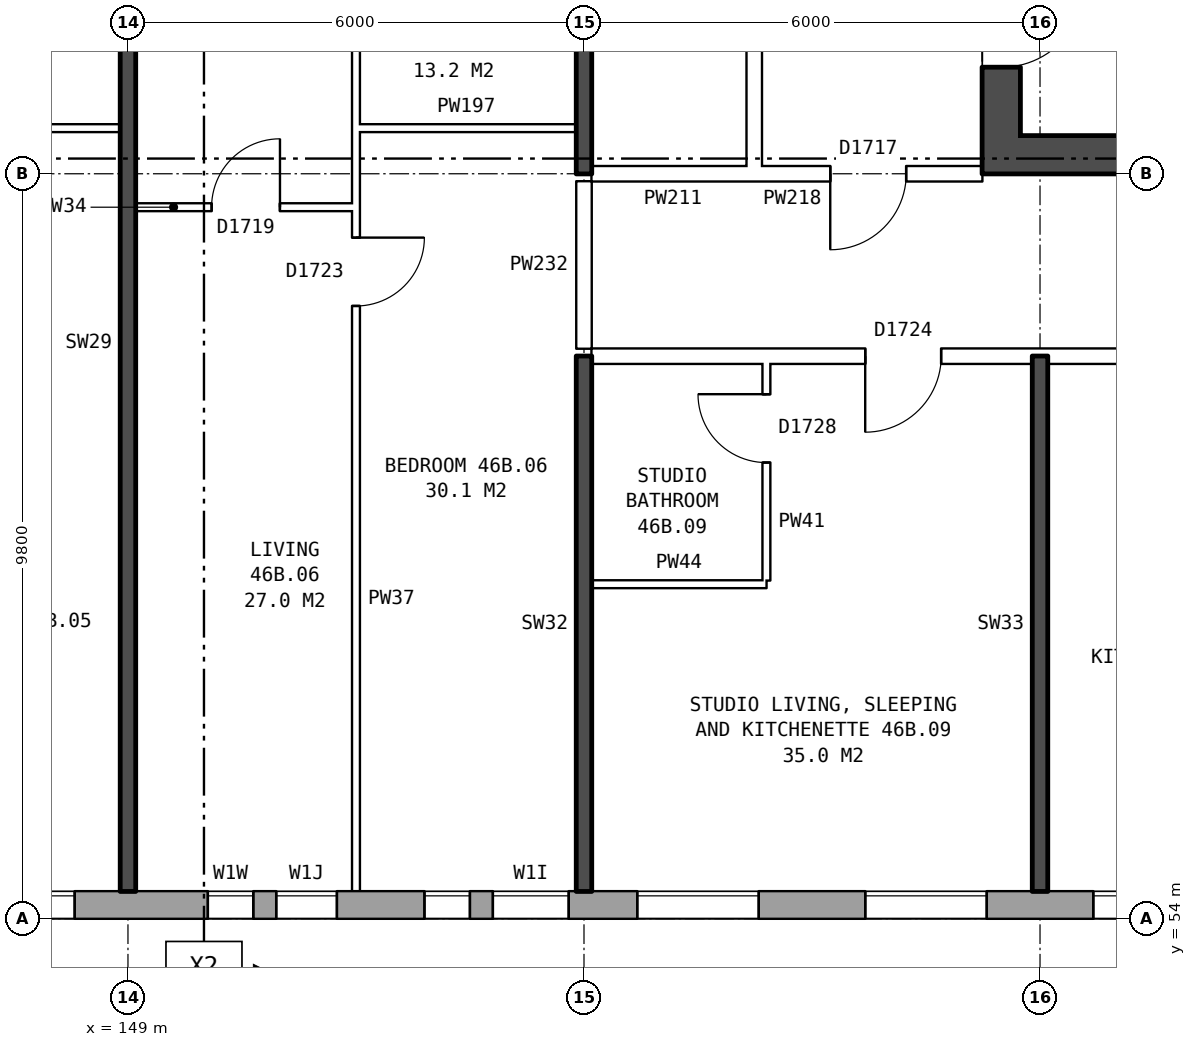
"""IFC4 building model, lengths in metres.
Left out: names, types, materials, properties, quantities, classifications, styles, units other than length and angle.
Written with IfcOpenShell. Run it as: python <this file> out.ifc"""

import sys

from ifc_helpers import new_model, si_unit, direction, frame, frame_2d, origin, place, context, subcontext, project, spatial, rectangle, extrude, element, fill, save


model = new_model("IFC4")
c1 = context("Model", 3, precision=1e-05, world=origin(), true_north=direction((0.0, 1.0)))
c2 = subcontext(c1, "Body", "Model", "MODEL_VIEW")
j1 = project(units=[si_unit("LENGTHUNIT", "METRE"), si_unit("PLANEANGLEUNIT", "RADIAN")], contexts=[c1])
p1 = place(None, origin())
s1 = spatial("IfcSite", under=j1, at=p1, CompositionType="ELEMENT")
p2 = place(p1, origin())
s2 = spatial("IfcBuilding", under=s1, at=p2, CompositionType="ELEMENT")
p3 = place(p2, frame((0.0, 0.0, 164.0)))
s3 = spatial("IfcBuildingStorey", under=s2, at=p3, CompositionType="ELEMENT", Elevation=164.0)
p4 = place(p3, frame((134.075, 54.18, 0.0), z_axis=(0.0, 0.0, 1.0), x_axis=(1.0, 0.0, 0.0)))
e1 = element("IfcWall", 1, at=p4, inside=s3, PredefinedType="STANDARD", context=c2, shape_type="SweptSolid", body=[
    extrude(rectangle(XDim=34.351, YDim=0.36, at=frame_2d((17.175, 0.0))), origin(), (0.0, 0.0, 1.0), 2.85),
])
p5 = place(p4, frame((0.625, 0.0, 0.8)))
e2 = element("IfcOpeningElement", 2, at=p5, cuts=e1, PredefinedType="OPENING", context=c2, shape_type="SweptSolid", body=[
    extrude(rectangle(XDim=1.6, YDim=1.8, at=frame_2d((0.8, 0.9))), frame((0.0, 0.19, 0.0), z_axis=(0.0, -1.0, 0.0), x_axis=(1.0, 0.0, 0.0)), (0.0, 0.0, 1.0), 0.38),
])
p6 = place(p4, frame((3.625, 0.0, 0.8)))
e3 = element("IfcOpeningElement", 3, at=p6, cuts=e1, PredefinedType="OPENING", context=c2, shape_type="SweptSolid", body=[
    extrude(rectangle(XDim=1.6, YDim=1.8, at=frame_2d((0.8, 0.9))), frame((0.0, 0.19, 0.0), z_axis=(0.0, -1.0, 0.0), x_axis=(1.0, 0.0, 0.0)), (0.0, 0.0, 1.0), 0.38),
])
p7 = place(p4, frame((6.625, 0.0, 0.8)))
e4 = element("IfcOpeningElement", 4, at=p7, cuts=e1, PredefinedType="OPENING", context=c2, shape_type="SweptSolid", body=[
    extrude(rectangle(XDim=1.6, YDim=1.8, at=frame_2d((0.8, 0.9))), frame((0.0, 0.19, 0.0), z_axis=(0.0, -1.0, 0.0), x_axis=(1.0, 0.0, 0.0)), (0.0, 0.0, 1.0), 0.38),
])
p8 = place(p4, frame((9.625, 0.0, 0.8)))
e5 = element("IfcOpeningElement", 5, at=p8, cuts=e1, PredefinedType="OPENING", context=c2, shape_type="SweptSolid", body=[
    extrude(rectangle(XDim=1.6, YDim=1.8, at=frame_2d((0.8, 0.9))), frame((0.0, 0.19, 0.0), z_axis=(0.0, -1.0, 0.0), x_axis=(1.0, 0.0, 0.0)), (0.0, 0.0, 1.0), 0.38),
])
p9 = place(p4, frame((12.625, 0.0, 0.8)))
e6 = element("IfcOpeningElement", 6, at=p9, cuts=e1, PredefinedType="OPENING", context=c2, shape_type="SweptSolid", body=[
    extrude(rectangle(XDim=1.6, YDim=1.8, at=frame_2d((0.8, 0.9))), frame((0.0, 0.19, 0.0), z_axis=(0.0, -1.0, 0.0), x_axis=(1.0, 0.0, 0.0)), (0.0, 0.0, 1.0), 0.38),
])
p10 = place(p4, frame((15.975, 0.0, 0.15)))
e7 = element("IfcOpeningElement", 7, at=p10, cuts=e1, PredefinedType="OPENING", context=c2, shape_type="SweptSolid", body=[
    extrude(rectangle(XDim=0.6, YDim=0.9, at=frame_2d((0.3, 0.45))), frame((0.0, 0.19, 0.0), z_axis=(0.0, -1.0, 0.0), x_axis=(1.0, 0.0, 0.0)), (0.0, 0.0, 1.0), 0.38),
])
p11 = place(p4, frame((18.825, 0.0, 1.7)))
e8 = element("IfcOpeningElement", 8, at=p11, cuts=e1, PredefinedType="OPENING", context=c2, shape_type="SweptSolid", body=[
    extrude(rectangle(XDim=0.6, YDim=0.9, at=frame_2d((0.3, 0.45))), frame((0.0, 0.19, 0.0), z_axis=(0.0, -1.0, 0.0), x_axis=(1.0, 0.0, 0.0)), (0.0, 0.0, 1.0), 0.38),
])
p12 = place(p4, frame((21.625, 0.0, 0.8)))
e9 = element("IfcOpeningElement", 9, at=p12, cuts=e1, PredefinedType="OPENING", context=c2, shape_type="SweptSolid", body=[
    extrude(rectangle(XDim=1.6, YDim=1.8, at=frame_2d((0.8, 0.9))), frame((0.0, 0.19, 0.0), z_axis=(0.0, -1.0, 0.0), x_axis=(1.0, 0.0, 0.0)), (0.0, 0.0, 1.0), 0.38),
])
p13 = place(p4, frame((24.625, 0.0, 0.8)))
e10 = element("IfcOpeningElement", 10, at=p13, cuts=e1, PredefinedType="OPENING", context=c2, shape_type="SweptSolid", body=[
    extrude(rectangle(XDim=1.6, YDim=1.8, at=frame_2d((0.8, 0.9))), frame((0.0, 0.19, 0.0), z_axis=(0.0, -1.0, 0.0), x_axis=(1.0, 0.0, 0.0)), (0.0, 0.0, 1.0), 0.38),
])
p14 = place(p4, frame((27.625, 0.0, 0.8)))
e11 = element("IfcOpeningElement", 11, at=p14, cuts=e1, PredefinedType="OPENING", context=c2, shape_type="SweptSolid", body=[
    extrude(rectangle(XDim=1.6, YDim=1.8, at=frame_2d((0.8, 0.9))), frame((0.0, 0.19, 0.0), z_axis=(0.0, -1.0, 0.0), x_axis=(1.0, 0.0, 0.0)), (0.0, 0.0, 1.0), 0.38),
])
p15 = place(p4, frame((30.625, 0.0, 0.8)))
e12 = element("IfcOpeningElement", 12, at=p15, cuts=e1, PredefinedType="OPENING", context=c2, shape_type="SweptSolid", body=[
    extrude(rectangle(XDim=1.6, YDim=1.8, at=frame_2d((0.8, 0.9))), frame((0.0, 0.19, 0.0), z_axis=(0.0, -1.0, 0.0), x_axis=(1.0, 0.0, 0.0)), (0.0, 0.0, 1.0), 0.38),
])
p16 = place(p4, frame((16.875, 0.0, 0.15)))
e13 = element("IfcOpeningElement", 13, at=p16, cuts=e1, PredefinedType="OPENING", context=c2, shape_type="SweptSolid", body=[
    extrude(rectangle(XDim=0.8, YDim=1.5, at=frame_2d((0.4, 0.75))), frame((0.0, 0.19, 0.0), z_axis=(0.0, -1.0, 0.0), x_axis=(1.0, 0.0, 0.0)), (0.0, 0.0, 1.0), 0.38),
])
p17 = place(p4, frame((19.725, 0.0, 0.9)))
e14 = element("IfcOpeningElement", 14, at=p17, cuts=e1, PredefinedType="OPENING", context=c2, shape_type="SweptSolid", body=[
    extrude(rectangle(XDim=1.0, YDim=1.5, at=frame_2d((0.5, 0.75))), frame((0.0, 0.19, 0.0), z_axis=(0.0, -1.0, 0.0), x_axis=(1.0, 0.0, 0.0)), (0.0, 0.0, 1.0), 0.38),
])
p18 = place(p3, frame((160.49, 76.2, 0.0), z_axis=(0.0, 0.0, 1.0), x_axis=(0.0, -1.0, 0.0)))
e15 = element("IfcWall", 15, at=p18, inside=s3, PredefinedType="SHEAR", context=c2, shape_type="SweptSolid", body=[
    extrude(rectangle(XDim=12.4, YDim=0.5, at=frame_2d((6.2, 0.0))), origin(), (0.0, 0.0, 1.0), 2.85),
])
p19 = place(p18, frame((1.325, 0.0, 0.0)))
e16 = element("IfcOpeningElement", 16, at=p19, cuts=e15, PredefinedType="OPENING", context=c2, shape_type="SweptSolid", body=[
    extrude(rectangle(XDim=1.1, YDim=2.1, at=frame_2d((0.55, 1.05))), frame((0.0, 0.26, 0.0), z_axis=(0.0, -1.0, 0.0), x_axis=(1.0, 0.0, 0.0)), (0.0, 0.0, 1.0), 0.52),
])
p20 = place(p18, frame((3.825, 0.0, 0.0)))
e17 = element("IfcOpeningElement", 17, at=p20, cuts=e15, PredefinedType="OPENING", context=c2, shape_type="SweptSolid", body=[
    extrude(rectangle(XDim=0.85, YDim=2.1, at=frame_2d((0.425, 1.05))), frame((0.0, 0.26, 0.0), z_axis=(0.0, -1.0, 0.0), x_axis=(1.0, 0.0, 0.0)), (0.0, 0.0, 1.0), 0.52),
])
p21 = place(p18, frame((5.975, 0.0, 0.0)))
e18 = element("IfcOpeningElement", 18, at=p21, cuts=e15, PredefinedType="OPENING", context=c2, shape_type="SweptSolid", body=[
    extrude(rectangle(XDim=0.85, YDim=2.1, at=frame_2d((0.425, 1.05))), frame((0.0, 0.26, 0.0), z_axis=(0.0, -1.0, 0.0), x_axis=(1.0, 0.0, 0.0)), (0.0, 0.0, 1.0), 0.52),
])
p22 = place(p18, frame((9.9, 0.0, 0.0)))
e19 = element("IfcOpeningElement", 19, at=p22, cuts=e15, PredefinedType="OPENING", context=c2, shape_type="SweptSolid", body=[
    extrude(rectangle(XDim=1.1, YDim=2.1, at=frame_2d((0.55, 1.05))), frame((0.0, 0.26, 0.0), z_axis=(0.0, -1.0, 0.0), x_axis=(1.0, 0.0, 0.0)), (0.0, 0.0, 1.0), 0.52),
])
p23 = place(p18, frame((8.125, 0.0, 0.0)))
e20 = element("IfcOpeningElement", 20, at=p23, cuts=e15, PredefinedType="OPENING", context=c2, shape_type="SweptSolid", body=[
    extrude(rectangle(XDim=0.85, YDim=2.1, at=frame_2d((0.425, 1.05))), frame((0.0, 0.26, 0.0), z_axis=(0.0, -1.0, 0.0), x_axis=(1.0, 0.0, 0.0)), (0.0, 0.0, 1.0), 0.52),
])
p24 = place(p3, frame((160.74, 64.05, 0.0), z_axis=(0.0, 0.0, 1.0), x_axis=(1.0, 0.0, 0.0)))
e21 = element("IfcWall", 21, at=p24, inside=s3, PredefinedType="SHEAR", context=c2, shape_type="SweptSolid", body=[
    extrude(rectangle(XDim=7.4, YDim=0.5, at=frame_2d((3.7, 0.0))), origin(), (0.0, 0.0, 1.0), 2.85),
])
p25 = place(p3, frame((157.24, 63.9, 0.0), z_axis=(0.0, 0.0, 1.0), x_axis=(0.0, 1.0, 0.0)))
e22 = element("IfcWall", 22, at=p25, inside=s3, PredefinedType="PARTITIONING", context=c2, shape_type="SweptSolid", body=[
    extrude(rectangle(XDim=12.2, YDim=0.2, at=frame_2d((6.1, 0.0))), origin(), (0.0, 0.0, 1.0), 2.85),
])
p26 = place(p25, frame((5.1, 0.0, 0.0)))
e23 = element("IfcOpeningElement", 23, at=p26, cuts=e22, PredefinedType="OPENING", context=c2, shape_type="SweptSolid", body=[
    extrude(rectangle(XDim=2.0, YDim=2.1, at=frame_2d((1.0, 1.05))), frame((0.0, 0.11, 0.0), z_axis=(0.0, -1.0, 0.0), x_axis=(1.0, 0.0, 0.0)), (0.0, 0.0, 1.0), 0.22),
])
p27 = place(p3, frame((155.1, 58.4, 0.0), z_axis=(0.0, 0.0, 1.0), x_axis=(1.0, 0.0, 0.0)))
e24 = element("IfcWall", 24, at=p27, inside=s3, PredefinedType="PARTITIONING", context=c2, shape_type="SweptSolid", body=[
    extrude(rectangle(XDim=2.3, YDim=0.1, at=frame_2d((1.15, 0.0))), origin(), (0.0, 0.0, 1.0), 2.85),
])
p28 = place(p3, frame((155.1, 61.4, 0.0), z_axis=(0.0, 0.0, 1.0), x_axis=(1.0, 0.0, 0.0)))
e25 = element("IfcWall", 25, at=p28, inside=s3, PredefinedType="PARTITIONING", context=c2, shape_type="SweptSolid", body=[
    extrude(rectangle(XDim=16.04, YDim=0.2, at=frame_2d((8.02, 0.0))), origin(), (0.0, 0.0, 1.0), 2.85),
])
p29 = place(p28, frame((3.6, 0.0, 0.0)))
e26 = element("IfcOpeningElement", 26, at=p29, cuts=e25, PredefinedType="OPENING", context=c2, shape_type="SweptSolid", body=[
    extrude(rectangle(XDim=1.0, YDim=2.1, at=frame_2d((0.5, 1.05))), frame((0.0, 0.11, 0.0), z_axis=(0.0, -1.0, 0.0), x_axis=(1.0, 0.0, 0.0)), (0.0, 0.0, 1.0), 0.22),
])
p30 = place(p28, frame((8.4, 0.0, 0.0)))
e27 = element("IfcOpeningElement", 27, at=p30, cuts=e25, PredefinedType="OPENING", context=c2, shape_type="SweptSolid", body=[
    extrude(rectangle(XDim=1.0, YDim=2.1, at=frame_2d((0.5, 1.05))), frame((0.0, 0.11, 0.0), z_axis=(0.0, -1.0, 0.0), x_axis=(1.0, 0.0, 0.0)), (0.0, 0.0, 1.0), 0.22),
])
p31 = place(p3, frame((149.1, 63.36, 0.0), z_axis=(0.0, 0.0, 1.0), x_axis=(1.0, 0.0, 0.0)))
e28 = element("IfcWall", 28, at=p31, inside=s3, PredefinedType="PARTITIONING", context=c2, shape_type="SweptSolid", body=[
    extrude(rectangle(XDim=2.9, YDim=0.1, at=frame_2d((1.45, 0.0))), origin(), (0.0, 0.0, 1.0), 2.85),
])
p32 = place(p31, frame((1.0, 0.0, 0.0)))
e29 = element("IfcOpeningElement", 29, at=p32, cuts=e28, PredefinedType="OPENING", context=c2, shape_type="SweptSolid", body=[
    extrude(rectangle(XDim=0.9, YDim=2.1, at=frame_2d((0.45, 1.05))), frame((0.0, 0.06, 0.0), z_axis=(0.0, -1.0, 0.0), x_axis=(1.0, 0.0, 0.0)), (0.0, 0.0, 1.0), 0.12),
])
p33 = place(p3, frame((155.1, 63.8, 0.0), z_axis=(0.0, 0.0, 1.0), x_axis=(1.0, 0.0, 0.0)))
e30 = element("IfcWall", 30, at=p33, inside=s3, PredefinedType="PARTITIONING", context=c2, shape_type="SweptSolid", body=[
    extrude(rectangle(XDim=2.14, YDim=0.2, at=frame_2d((1.07, 0.0))), origin(), (0.0, 0.0, 1.0), 2.85),
])
p34 = place(p3, frame((157.24, 63.8, 0.0), z_axis=(0.0, 0.0, 1.0), x_axis=(1.0, 0.0, 0.0)))
e31 = element("IfcWall", 31, at=p34, inside=s3, PredefinedType="PARTITIONING", context=c2, shape_type="SweptSolid", body=[
    extrude(rectangle(XDim=3.0, YDim=0.2, at=frame_2d((1.5, 0.0))), origin(), (0.0, 0.0, 1.0), 2.85),
])
p35 = place(p34, frame((1.0, 0.0, 0.0)))
e32 = element("IfcOpeningElement", 32, at=p35, cuts=e31, PredefinedType="OPENING", context=c2, shape_type="SweptSolid", body=[
    extrude(rectangle(XDim=1.0, YDim=2.1, at=frame_2d((0.5, 1.05))), frame((0.0, 0.11, 0.0), z_axis=(0.0, -1.0, 0.0), x_axis=(1.0, 0.0, 0.0)), (0.0, 0.0, 1.0), 0.22),
])
for number, where, z_axis, x_axis in (
    (33, (146.0, 64.4, 0.0), (0.0, 0.0, 1.0), (1.0, 0.0, 0.0)),
    (34, (152.0, 64.4, 0.0), (0.0, 0.0, 1.0), (1.0, 0.0, 0.0)),
):
    element("IfcWall", number, at=place(p3, frame(where, z_axis=z_axis, x_axis=x_axis)), inside=s3, PredefinedType="PARTITIONING", context=c2, shape_type="SweptSolid", body=[
        extrude(rectangle(XDim=2.9, YDim=0.1, at=frame_2d((1.45, 0.0))), origin(), (0.0, 0.0, 1.0), 2.85),
    ])
p36 = place(p3, frame((149.0, 54.36, 0.0), z_axis=(0.0, 0.0, 1.0), x_axis=(0.0, 1.0, 0.0)))
e35 = element("IfcWall", 35, at=p36, inside=s3, PredefinedType="SOLIDWALL", context=c2, shape_type="SweptSolid", body=[
    extrude(rectangle(XDim=14.44, YDim=0.2, at=frame_2d((7.22, 0.0))), origin(), (0.0, 0.0, 1.0), 2.85),
])
p37 = place(p3, frame((152.0, 54.36, 0.0), z_axis=(0.0, 0.0, 1.0), x_axis=(0.0, 1.0, 0.0)))
e36 = element("IfcWall", 36, at=p37, inside=s3, PredefinedType="PARTITIONING", context=c2, shape_type="SweptSolid", body=[
    extrude(rectangle(XDim=14.34, YDim=0.1, at=frame_2d((7.17, 0.0))), origin(), (0.0, 0.0, 1.0), 2.85),
])
p38 = place(p37, frame((7.7, 0.0, 0.0)))
e37 = element("IfcOpeningElement", 37, at=p38, cuts=e36, PredefinedType="OPENING", context=c2, shape_type="SweptSolid", body=[
    extrude(rectangle(XDim=0.9, YDim=2.1, at=frame_2d((0.45, 1.05))), frame((0.0, 0.06, 0.0), z_axis=(0.0, -1.0, 0.0), x_axis=(1.0, 0.0, 0.0)), (0.0, 0.0, 1.0), 0.12),
])
p39 = place(p37, frame((13.04, 0.0, 0.0)))
e38 = element("IfcOpeningElement", 38, at=p39, cuts=e36, PredefinedType="OPENING", context=c2, shape_type="SweptSolid", body=[
    extrude(rectangle(XDim=0.9, YDim=2.1, at=frame_2d((0.45, 1.05))), frame((0.0, 0.06, 0.0), z_axis=(0.0, -1.0, 0.0), x_axis=(1.0, 0.0, 0.0)), (0.0, 0.0, 1.0), 0.12),
])
p40 = place(p3, frame((155.0, 54.36, 0.0), z_axis=(0.0, 0.0, 1.0), x_axis=(0.0, 1.0, 0.0)))
e39 = element("IfcWall", 39, at=p40, inside=s3, PredefinedType="SOLIDWALL", context=c2, shape_type="SweptSolid", body=[
    extrude(rectangle(XDim=7.04, YDim=0.2, at=frame_2d((3.52, 0.0))), origin(), (0.0, 0.0, 1.0), 2.85),
])
p41 = place(p3, frame((155.0, 61.5, 0.0), z_axis=(0.0, 0.0, 1.0), x_axis=(0.0, 1.0, 0.0)))
e40 = element("IfcWall", 40, at=p41, inside=s3, PredefinedType="PARTITIONING", context=c2, shape_type="SweptSolid", body=[
    extrude(rectangle(XDim=2.2, YDim=0.2, at=frame_2d((1.1, 0.0))), origin(), (0.0, 0.0, 1.0), 2.85),
])
p42 = place(p3, frame((155.0, 63.8, 0.0), z_axis=(0.0, 0.0, 1.0), x_axis=(0.0, 1.0, 0.0)))
e41 = element("IfcWall", 41, at=p42, inside=s3, PredefinedType="SOLIDWALL", context=c2, shape_type="SweptSolid", body=[
    extrude(rectangle(XDim=5.0, YDim=0.2, at=frame_2d((2.5, 0.0))), origin(), (0.0, 0.0, 1.0), 2.85),
])
p43 = place(p3, frame((157.4, 58.45, 0.0), z_axis=(0.0, 0.0, 1.0), x_axis=(0.0, 1.0, 0.0)))
e42 = element("IfcWall", 42, at=p43, inside=s3, PredefinedType="PARTITIONING", context=c2, shape_type="SweptSolid", body=[
    extrude(rectangle(XDim=2.85, YDim=0.1, at=frame_2d((1.425, 0.0))), origin(), (0.0, 0.0, 1.0), 2.85),
])
p44 = place(p43, frame((1.55, 0.0, 0.0)))
e43 = element("IfcOpeningElement", 43, at=p44, cuts=e42, PredefinedType="OPENING", context=c2, shape_type="SweptSolid", body=[
    extrude(rectangle(XDim=0.9, YDim=2.1, at=frame_2d((0.45, 1.05))), frame((0.0, 0.06, 0.0), z_axis=(0.0, -1.0, 0.0), x_axis=(1.0, 0.0, 0.0)), (0.0, 0.0, 1.0), 0.12),
])
p45 = place(p3, frame((161.0, 54.36, 0.0), z_axis=(0.0, 0.0, 1.0), x_axis=(0.0, 1.0, 0.0)))
e44 = element("IfcWall", 44, at=p45, inside=s3, PredefinedType="SOLIDWALL", context=c2, shape_type="SweptSolid", body=[
    extrude(rectangle(XDim=7.04, YDim=0.2, at=frame_2d((3.52, 0.0))), origin(), (0.0, 0.0, 1.0), 2.85),
])
p46 = place(p9, origin())
e45 = element("IfcWindow", 45, at=p46, inside=s3, PartitioningType="SINGLE_PANEL", PredefinedType="WINDOW", context=c2, shape_type="SweptSolid", body=[
    extrude(rectangle(XDim=1.6, YDim=1.8, at=frame_2d((0.8, 0.9))), frame((0.0, 0.15, 0.0), z_axis=(0.0, -1.0, 0.0), x_axis=(1.0, 0.0, 0.0)), (0.0, 0.0, 1.0), 0.06),
])
fill(e6, e45)
p47 = place(p10, origin())
e46 = element("IfcWindow", 46, at=p47, inside=s3, PartitioningType="SINGLE_PANEL", PredefinedType="WINDOW", context=c2, shape_type="SweptSolid", body=[
    extrude(rectangle(XDim=0.6, YDim=0.9, at=frame_2d((0.3, 0.45))), frame((0.0, 0.15, 0.0), z_axis=(0.0, -1.0, 0.0), x_axis=(1.0, 0.0, 0.0)), (0.0, 0.0, 1.0), 0.06),
])
fill(e7, e46)
p48 = place(p11, origin())
e47 = element("IfcWindow", 47, at=p48, inside=s3, PartitioningType="SINGLE_PANEL", PredefinedType="WINDOW", context=c2, shape_type="SweptSolid", body=[
    extrude(rectangle(XDim=0.6, YDim=0.9, at=frame_2d((0.3, 0.45))), frame((0.0, 0.15, 0.0), z_axis=(0.0, -1.0, 0.0), x_axis=(1.0, 0.0, 0.0)), (0.0, 0.0, 1.0), 0.06),
])
fill(e8, e47)
p49 = place(p12, origin())
e48 = element("IfcWindow", 48, at=p49, inside=s3, PartitioningType="SINGLE_PANEL", PredefinedType="WINDOW", context=c2, shape_type="SweptSolid", body=[
    extrude(rectangle(XDim=1.6, YDim=1.8, at=frame_2d((0.8, 0.9))), frame((0.0, 0.15, 0.0), z_axis=(0.0, -1.0, 0.0), x_axis=(1.0, 0.0, 0.0)), (0.0, 0.0, 1.0), 0.06),
])
fill(e9, e48)
p50 = place(p13, origin())
e49 = element("IfcWindow", 49, at=p50, inside=s3, PartitioningType="SINGLE_PANEL", PredefinedType="WINDOW", context=c2, shape_type="SweptSolid", body=[
    extrude(rectangle(XDim=1.6, YDim=1.8, at=frame_2d((0.8, 0.9))), frame((0.0, 0.15, 0.0), z_axis=(0.0, -1.0, 0.0), x_axis=(1.0, 0.0, 0.0)), (0.0, 0.0, 1.0), 0.06),
])
fill(e10, e49)
p51 = place(p14, origin())
e50 = element("IfcWindow", 50, at=p51, inside=s3, PartitioningType="SINGLE_PANEL", PredefinedType="WINDOW", context=c2, shape_type="SweptSolid", body=[
    extrude(rectangle(XDim=1.6, YDim=1.8, at=frame_2d((0.8, 0.9))), frame((0.0, 0.15, 0.0), z_axis=(0.0, -1.0, 0.0), x_axis=(1.0, 0.0, 0.0)), (0.0, 0.0, 1.0), 0.06),
])
fill(e11, e50)
p52 = place(p22, origin())
e51 = element("IfcDoor", 51, at=p52, inside=s3, OperationType="SINGLE_SWING_LEFT", PredefinedType="DOOR", context=c2, shape_type="SweptSolid", body=[
    extrude(rectangle(XDim=1.1, YDim=2.1, at=frame_2d((0.55, 1.05))), frame((0.0, 0.235, 0.0), z_axis=(0.0, -1.0, 0.0), x_axis=(1.0, 0.0, 0.0)), (0.0, 0.0, 1.0), 0.05),
])
fill(e19, e51)
p53 = place(p35, frame((1.0, 0.0, 0.0), z_axis=(0.0, 0.0, 1.0), x_axis=(-1.0, 0.0, 0.0)))
e52 = element("IfcDoor", 52, at=p53, inside=s3, OperationType="SINGLE_SWING_RIGHT", PredefinedType="DOOR", context=c2, shape_type="SweptSolid", body=[
    extrude(rectangle(XDim=1.0, YDim=2.1, at=frame_2d((0.5, 1.05))), frame((0.0, 0.025, 0.0), z_axis=(0.0, -1.0, 0.0), x_axis=(1.0, 0.0, 0.0)), (0.0, 0.0, 1.0), 0.05),
])
fill(e32, e52)
p54 = place(p38, frame((0.9, 0.0, 0.0), z_axis=(0.0, 0.0, 1.0), x_axis=(-1.0, 0.0, 0.0)))
e53 = element("IfcDoor", 53, at=p54, inside=s3, OperationType="SINGLE_SWING_LEFT", PredefinedType="DOOR", context=c2, shape_type="SweptSolid", body=[
    extrude(rectangle(XDim=0.9, YDim=2.1, at=frame_2d((0.45, 1.05))), frame((0.0, 0.025, 0.0), z_axis=(0.0, -1.0, 0.0), x_axis=(1.0, 0.0, 0.0)), (0.0, 0.0, 1.0), 0.05),
])
fill(e37, e53)
p55 = place(p32, origin())
e54 = element("IfcDoor", 54, at=p55, inside=s3, OperationType="SINGLE_SWING_RIGHT", PredefinedType="DOOR", context=c2, shape_type="SweptSolid", body=[
    extrude(rectangle(XDim=0.9, YDim=2.1, at=frame_2d((0.45, 1.05))), frame((0.0, 0.025, 0.0), z_axis=(0.0, -1.0, 0.0), x_axis=(1.0, 0.0, 0.0)), (0.0, 0.0, 1.0), 0.05),
])
fill(e29, e54)
p56 = place(p29, frame((1.0, 0.0, 0.0), z_axis=(0.0, 0.0, 1.0), x_axis=(-1.0, 0.0, 0.0)))
e55 = element("IfcDoor", 55, at=p56, inside=s3, OperationType="SINGLE_SWING_RIGHT", PredefinedType="DOOR", context=c2, shape_type="SweptSolid", body=[
    extrude(rectangle(XDim=1.0, YDim=2.1, at=frame_2d((0.5, 1.05))), frame((0.0, 0.025, 0.0), z_axis=(0.0, -1.0, 0.0), x_axis=(1.0, 0.0, 0.0)), (0.0, 0.0, 1.0), 0.05),
])
fill(e26, e55)
p57 = place(p44, origin())
e56 = element("IfcDoor", 56, at=p57, inside=s3, OperationType="SINGLE_SWING_RIGHT", PredefinedType="DOOR", context=c2, shape_type="SweptSolid", body=[
    extrude(rectangle(XDim=0.9, YDim=2.1, at=frame_2d((0.45, 1.05))), frame((0.0, 0.025, 0.0), z_axis=(0.0, -1.0, 0.0), x_axis=(1.0, 0.0, 0.0)), (0.0, 0.0, 1.0), 0.05),
])
fill(e43, e56)
p58 = place(p16, origin())
e57 = element("IfcWindow", 57, at=p58, inside=s3, PartitioningType="SINGLE_PANEL", PredefinedType="WINDOW", context=c2, shape_type="SweptSolid", body=[
    extrude(rectangle(XDim=0.8, YDim=1.5, at=frame_2d((0.4, 0.75))), frame((0.0, 0.15, 0.0), z_axis=(0.0, -1.0, 0.0), x_axis=(1.0, 0.0, 0.0)), (0.0, 0.0, 1.0), 0.06),
])
fill(e13, e57)
p59 = place(p17, origin())
e58 = element("IfcWindow", 58, at=p59, inside=s3, PartitioningType="SINGLE_PANEL", PredefinedType="WINDOW", context=c2, shape_type="SweptSolid", body=[
    extrude(rectangle(XDim=1.0, YDim=1.5, at=frame_2d((0.5, 0.75))), frame((0.0, 0.15, 0.0), z_axis=(0.0, -1.0, 0.0), x_axis=(1.0, 0.0, 0.0)), (0.0, 0.0, 1.0), 0.06),
])
fill(e14, e58)
save(model, sys.argv[1])
